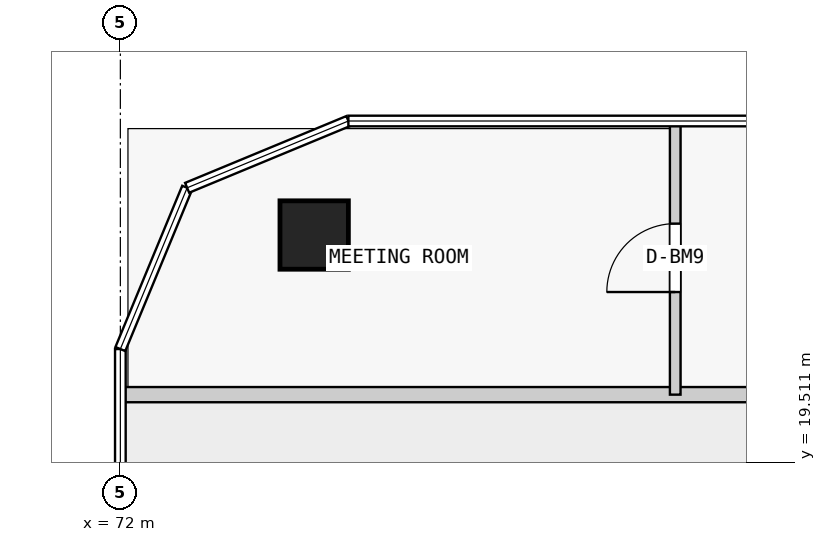
"""IFC4 building model, lengths in metres.
Left out: names, types, materials, properties, quantities, classifications, styles, units other than length and angle.
Written with IfcOpenShell. Run it as: python <this file> out.ifc"""

import sys

from ifc_helpers import new_model, si_unit, direction, frame, frame_2d, origin, origin_2d, place, context, subcontext, project, spatial, rectangle, extrude, element, fill, save


model = new_model("IFC4")
c1 = context("Model", 3, precision=1e-05, world=origin(), true_north=direction((0.0, 1.0)))
c2 = subcontext(c1, "Body", "Model", "MODEL_VIEW")
j1 = project(units=[si_unit("LENGTHUNIT", "METRE"), si_unit("PLANEANGLEUNIT", "RADIAN")], contexts=[c1])
p1 = place(None, origin())
s1 = spatial("IfcSite", under=j1, at=p1, CompositionType="ELEMENT")
p2 = place(p1, origin())
s2 = spatial("IfcBuilding", under=s1, at=p2, CompositionType="ELEMENT")
p3 = place(p2, frame((0.0, 0.0, 109.8)))
s3 = spatial("IfcBuildingStorey", under=s2, at=p3, CompositionType="ELEMENT", Elevation=109.8)
p4 = place(p3, frame((74.55, 22.5, 0.0), z_axis=(0.0, 0.0, 1.0), x_axis=(1.0, 0.0, 0.0)))
e1 = element("IfcColumn", 1, at=p4, inside=s3, PredefinedType="COLUMN", context=c2, shape_type="SweptSolid", body=[
    extrude(rectangle(XDim=0.9, YDim=0.9, at=origin_2d()), origin(), (0.0, 0.0, 1.0), 3.5),
])
p5 = place(p3, frame((72.0, 20.4, 0.0), z_axis=(0.0, 0.0, 1.0), x_axis=(1.0, 0.0, 0.0)))
e2 = element("IfcWall", 2, at=p5, inside=s3, PredefinedType="PARTITIONING", context=c2, shape_type="SweptSolid", body=[
    extrude(rectangle(XDim=20.0, YDim=0.2, at=frame_2d((10.0, 0.0))), origin(), (0.0, 0.0, 1.0), 3.25),
])
p6 = place(p5, frame((11.5, 0.0, 0.0)))
e3 = element("IfcOpeningElement", 3, at=p6, cuts=e2, PredefinedType="OPENING", context=c2, shape_type="SweptSolid", body=[
    extrude(rectangle(XDim=1.0, YDim=2.4, at=frame_2d((0.5, 1.2))), frame((0.0, 0.11, 0.0), z_axis=(0.0, -1.0, 0.0), x_axis=(1.0, 0.0, 0.0)), (0.0, 0.0, 1.0), 0.22),
])
p7 = place(p3, frame((79.3, 20.4, 0.0), z_axis=(0.0, 0.0, 1.0), x_axis=(0.0, 1.0, 0.0)))
e4 = element("IfcWall", 4, at=p7, inside=s3, PredefinedType="PARTITIONING", context=c2, shape_type="SweptSolid", body=[
    extrude(rectangle(XDim=3.6, YDim=0.14, at=frame_2d((1.8, 0.0))), origin(), (0.0, 0.0, 1.0), 3.25),
])
p8 = place(p7, frame((1.35, 0.0, 0.0)))
e5 = element("IfcOpeningElement", 5, at=p8, cuts=e4, PredefinedType="OPENING", context=c2, shape_type="SweptSolid", body=[
    extrude(rectangle(XDim=0.9, YDim=2.4, at=frame_2d((0.45, 1.2))), frame((0.0, 0.08, 0.0), z_axis=(0.0, -1.0, 0.0), x_axis=(1.0, 0.0, 0.0)), (0.0, 0.0, 1.0), 0.16),
])
p9 = place(p8, origin())
e6 = element("IfcDoor", 6, at=p9, inside=s3, OperationType="SINGLE_SWING_LEFT", PredefinedType="DOOR", context=c2, shape_type="SweptSolid", body=[
    extrude(rectangle(XDim=0.9, YDim=2.4, at=frame_2d((0.45, 1.2))), frame((0.0, 0.025, 0.0), z_axis=(0.0, -1.0, 0.0), x_axis=(1.0, 0.0, 0.0)), (0.0, 0.0, 1.0), 0.05),
])
fill(e5, e6)
save(model, sys.argv[1])
